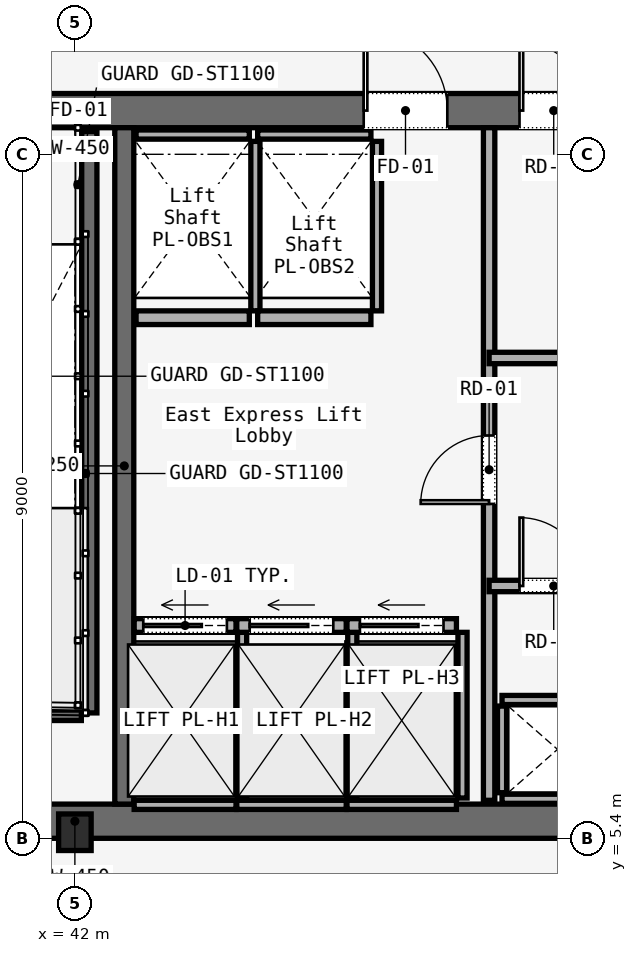
"""IFC4 building model, lengths in metres.
Left out: names, types, materials, properties, quantities, classifications, styles, units other than length and angle.
Written with IfcOpenShell. Run it as: python <this file> out.ifc"""

import sys

from ifc_helpers import new_model, si_unit, direction, frame, frame_2d, origin, origin_2d, place, context, subcontext, project, spatial, rectangle, i_section, extrude, element, fill, save


model = new_model("IFC4")
c1 = context("Model", 3, precision=1e-05, world=origin(), true_north=direction((0.0, 1.0)))
c2 = subcontext(c1, "Body", "Model", "MODEL_VIEW")
j1 = project(units=[si_unit("LENGTHUNIT", "METRE"), si_unit("PLANEANGLEUNIT", "RADIAN")], contexts=[c1])
p1 = place(None, origin())
s1 = spatial("IfcSite", under=j1, at=p1, CompositionType="ELEMENT")
p2 = place(p1, origin())
s2 = spatial("IfcBuilding", under=s1, at=p2, CompositionType="ELEMENT")
p3 = place(p2, frame((0.0, 0.0, 117.4)))
s3 = spatial("IfcBuildingStorey", under=s2, at=p3, CompositionType="ELEMENT", Elevation=117.4)
p4 = place(p3, frame((26.45, 14.975, 0.0), z_axis=(0.0, 0.0, 1.0), x_axis=(1.0, 0.0, 0.0)))
e1 = element("IfcWall", 1, at=p4, inside=s3, PredefinedType="SOLIDWALL", context=c2, shape_type="SweptSolid", body=[
    extrude(rectangle(XDim=31.1, YDim=0.45, at=frame_2d((15.55, 0.0))), origin(), (0.0, 0.0, 1.0), 4.52),
])
p5 = place(p4, frame((1.65, 0.0, 0.0)))
e2 = element("IfcOpeningElement", 2, at=p5, cuts=e1, PredefinedType="OPENING", context=c2, shape_type="SweptSolid", body=[
    extrude(rectangle(XDim=1.1, YDim=2.2, at=frame_2d((0.55, 1.1))), frame((0.0, 0.225, 0.0), z_axis=(0.0, -1.0, 0.0), x_axis=(1.0, 0.0, 0.0)), (0.0, 0.0, 1.0), 0.45),
])
p6 = place(p4, frame((13.65, 0.0, 0.0)))
e3 = element("IfcOpeningElement", 3, at=p6, cuts=e1, PredefinedType="OPENING", context=c2, shape_type="SweptSolid", body=[
    extrude(rectangle(XDim=1.1, YDim=2.2, at=frame_2d((0.55, 1.1))), frame((0.0, 0.225, 0.0), z_axis=(0.0, -1.0, 0.0), x_axis=(1.0, 0.0, 0.0)), (0.0, 0.0, 1.0), 0.45),
])
p7 = place(p4, frame((25.55, 0.0, 0.0)))
e4 = element("IfcOpeningElement", 4, at=p7, cuts=e1, PredefinedType="OPENING", context=c2, shape_type="SweptSolid", body=[
    extrude(rectangle(XDim=1.1, YDim=2.2, at=frame_2d((0.55, 1.1))), frame((0.0, 0.225, 0.0), z_axis=(0.0, -1.0, 0.0), x_axis=(1.0, 0.0, 0.0)), (0.0, 0.0, 1.0), 0.45),
])
p8 = place(p4, frame((10.7, 0.0, 0.0)))
e5 = element("IfcOpeningElement", 5, at=p8, cuts=e1, PredefinedType="OPENING", context=c2, shape_type="SweptSolid", body=[
    extrude(rectangle(XDim=1.4, YDim=2.2, at=frame_2d((0.7, 1.1))), frame((0.0, 0.225, 0.0), z_axis=(0.0, -1.0, 0.0), x_axis=(1.0, 0.0, 0.0)), (0.0, 0.0, 1.0), 0.45),
])
p9 = place(p4, frame((19.35, 0.0, 0.0)))
e6 = element("IfcOpeningElement", 6, at=p9, cuts=e1, PredefinedType="OPENING", context=c2, shape_type="SweptSolid", body=[
    extrude(rectangle(XDim=1.1, YDim=2.2, at=frame_2d((0.55, 1.1))), frame((0.0, 0.225, 0.0), z_axis=(0.0, -1.0, 0.0), x_axis=(1.0, 0.0, 0.0)), (0.0, 0.0, 1.0), 0.45),
])
p10 = place(p4, frame((21.4, 0.0, 0.0)))
e7 = element("IfcOpeningElement", 7, at=p10, cuts=e1, PredefinedType="OPENING", context=c2, shape_type="SweptSolid", body=[
    extrude(rectangle(XDim=0.9, YDim=2.1, at=frame_2d((0.45, 1.05))), frame((0.0, 0.225, 0.0), z_axis=(0.0, -1.0, 0.0), x_axis=(1.0, 0.0, 0.0)), (0.0, 0.0, 1.0), 0.45),
])
p11 = place(p4, frame((23.35, 0.0, 0.0)))
e8 = element("IfcOpeningElement", 8, at=p11, cuts=e1, PredefinedType="OPENING", context=c2, shape_type="SweptSolid", body=[
    extrude(rectangle(XDim=1.3, YDim=2.3, at=frame_2d((0.65, 1.15))), frame((0.0, 0.225, 0.0), z_axis=(0.0, -1.0, 0.0), x_axis=(1.0, 0.0, 0.0)), (0.0, 0.0, 1.0), 0.45),
])
p12 = place(p3, frame((26.45, 5.625, 0.0), z_axis=(0.0, 0.0, 1.0), x_axis=(1.0, 0.0, 0.0)))
e9 = element("IfcWall", 9, at=p12, inside=s3, PredefinedType="SOLIDWALL", context=c2, shape_type="SweptSolid", body=[
    extrude(rectangle(XDim=31.1, YDim=0.45, at=frame_2d((15.55, 0.0))), origin(), (0.0, 0.0, 1.0), 4.52),
])
p13 = place(p3, frame((42.65, 5.85, 0.0), z_axis=(0.0, 0.0, 1.0), x_axis=(0.0, 1.0, 0.0)))
e10 = element("IfcWall", 10, at=p13, inside=s3, PredefinedType="SOLIDWALL", context=c2, shape_type="SweptSolid", body=[
    extrude(rectangle(XDim=8.9, YDim=0.25, at=frame_2d((4.45, 0.0))), origin(), (0.0, 0.0, 1.0), 4.52),
])
p14 = place(p3, frame((42.0, 5.48, 0.0), z_axis=(0.0, 0.0, 1.0), x_axis=(1.0, 0.0, 0.0)))
e11 = element("IfcColumn", 11, at=p14, inside=s3, PredefinedType="COLUMN", context=c2, shape_type="SweptSolid", body=[
    extrude(i_section(OverallWidth=0.428, OverallDepth=0.481, WebThickness=0.051, FlangeThickness=0.065, FilletRadius=0.015, at=origin_2d()), origin(), (0.0, 0.0, 1.0), 4.52),
])
p15 = place(p3, frame((42.19, 14.7, 0.0), z_axis=(0.0, 0.0, 1.0), x_axis=(0.0, -1.0, 0.0)))
e12 = element("IfcWall", 12, at=p15, inside=s3, PredefinedType="SOLIDWALL", context=c2, shape_type="SweptSolid", body=[
    extrude(rectangle(XDim=7.65, YDim=0.2, at=frame_2d((3.825, 0.0))), origin(), (0.0, 0.0, 1.0), 4.8),
])
p16 = place(p3, frame((38.97, 7.05, 0.0), z_axis=(0.0, 0.0, 1.0), x_axis=(1.0, 0.0, 0.0)))
e13 = element("IfcWall", 13, at=p16, inside=s3, PredefinedType="SOLIDWALL", context=c2, shape_type="SweptSolid", body=[
    extrude(rectangle(XDim=3.115, YDim=0.2, at=frame_2d((1.558, 0.0))), origin(), (0.0, 0.0, 1.0), 4.8),
])
for number, where, z_axis, x_axis in (
    (14, (47.62, 5.92, 0.0), (0.0, 0.0, 1.0), (1.0, 0.0, 0.0)),
    (15, (47.62, 7.22, 0.0), (0.0, 0.0, 1.0), (1.0, 0.0, 0.0)),
):
    element("IfcWall", number, at=place(p3, frame(where, z_axis=z_axis, x_axis=x_axis)), inside=s3, PredefinedType="SOLIDWALL", context=c2, shape_type="SweptSolid", body=[
        extrude(rectangle(XDim=1.46, YDim=0.12, at=frame_2d((0.73, 0.0))), origin(), (0.0, 0.0, 1.0), 3.39),
    ])
p17 = place(p3, frame((47.62, 6.0, 0.0), z_axis=(0.0, 0.0, 1.0), x_axis=(0.0, 1.0, 0.0)))
e16 = element("IfcWall", 16, at=p17, inside=s3, PredefinedType="SOLIDWALL", context=c2, shape_type="SweptSolid", body=[
    extrude(rectangle(XDim=1.14, YDim=0.12, at=frame_2d((0.57, 0.0))), origin(), (0.0, 0.0, 1.0), 3.39),
])
p18 = place(p3, frame((47.45, 5.9, 0.0), z_axis=(0.0, 0.0, 1.0), x_axis=(0.0, 1.0, 0.0)))
e17 = element("IfcWall", 17, at=p18, inside=s3, PredefinedType="PARTITIONING", context=c2, shape_type="SweptSolid", body=[
    extrude(rectangle(XDim=8.85, YDim=0.15, at=frame_2d((4.425, 0.0))), origin(), (0.0, 0.0, 1.0), 3.39),
])
p19 = place(p18, frame((3.9, 0.0, 0.0)))
e18 = element("IfcOpeningElement", 18, at=p19, cuts=e17, PredefinedType="OPENING", context=c2, shape_type="SweptSolid", body=[
    extrude(rectangle(XDim=0.9, YDim=2.1, at=frame_2d((0.45, 1.05))), frame((0.0, 0.075, 0.0), z_axis=(0.0, -1.0, 0.0), x_axis=(1.0, 0.0, 0.0)), (0.0, 0.0, 1.0), 0.15),
])
p20 = place(p3, frame((47.45, 8.72, 0.0), z_axis=(0.0, 0.0, 1.0), x_axis=(1.0, 0.0, 0.0)))
e19 = element("IfcWall", 19, at=p20, inside=s3, PredefinedType="PARTITIONING", context=c2, shape_type="SweptSolid", body=[
    extrude(rectangle(XDim=1.73, YDim=0.15, at=frame_2d((0.865, 0.0))), origin(), (0.0, 0.0, 1.0), 3.39),
])
p21 = place(p20, frame((0.4, 0.0, 0.0)))
e20 = element("IfcOpeningElement", 20, at=p21, cuts=e19, PredefinedType="OPENING", context=c2, shape_type="SweptSolid", body=[
    extrude(rectangle(XDim=0.9, YDim=2.1, at=frame_2d((0.45, 1.05))), frame((0.0, 0.075, 0.0), z_axis=(0.0, -1.0, 0.0), x_axis=(1.0, 0.0, 0.0)), (0.0, 0.0, 1.0), 0.15),
])
p22 = place(p3, frame((47.45, 11.72, 0.0), z_axis=(0.0, 0.0, 1.0), x_axis=(1.0, 0.0, 0.0)))
e21 = element("IfcWall", 21, at=p22, inside=s3, PredefinedType="PARTITIONING", context=c2, shape_type="SweptSolid", body=[
    extrude(rectangle(XDim=1.73, YDim=0.15, at=frame_2d((0.865, 0.0))), origin(), (0.0, 0.0, 1.0), 3.39),
])
p23 = place(p3, frame((42.78, 8.2, 0.0), z_axis=(0.0, 0.0, 1.0), x_axis=(1.0, 0.0, 0.0)))
e22 = element("IfcWall", 22, at=p23, inside=s3, PredefinedType="SOLIDWALL", context=c2, shape_type="SweptSolid", body=[
    extrude(rectangle(XDim=1.34, YDim=0.18, at=frame_2d((0.67, 0.0))), origin(), (0.0, 0.0, 1.0), 3.39),
])
p24 = place(p23, frame((0.12, 0.0, 0.0)))
e23 = element("IfcOpeningElement", 23, at=p24, cuts=e22, PredefinedType="OPENING", context=c2, shape_type="SweptSolid", body=[
    extrude(rectangle(XDim=1.1, YDim=2.2, at=frame_2d((0.55, 1.1))), frame((0.0, 0.09, 0.0), z_axis=(0.0, -1.0, 0.0), x_axis=(1.0, 0.0, 0.0)), (0.0, 0.0, 1.0), 0.18),
])
p25 = place(p3, frame((42.78, 5.84, 0.0), z_axis=(0.0, 0.0, 1.0), x_axis=(1.0, 0.0, 0.0)))
e24 = element("IfcWall", 24, at=p25, inside=s3, PredefinedType="SOLIDWALL", context=c2, shape_type="SweptSolid", body=[
    extrude(rectangle(XDim=1.34, YDim=0.12, at=frame_2d((0.67, 0.0))), origin(), (0.0, 0.0, 1.0), 3.39),
])
p26 = place(p3, frame((44.2, 5.93, 0.0), z_axis=(0.0, 0.0, 1.0), x_axis=(0.0, 1.0, 0.0)))
e25 = element("IfcWall", 25, at=p26, inside=s3, PredefinedType="SOLIDWALL", context=c2, shape_type="SweptSolid", body=[
    extrude(rectangle(XDim=2.18, YDim=0.12, at=frame_2d((1.09, 0.0))), origin(), (0.0, 0.0, 1.0), 3.39),
])
p27 = place(p3, frame((44.13, 8.2, 0.0), z_axis=(0.0, 0.0, 1.0), x_axis=(1.0, 0.0, 0.0)))
e26 = element("IfcWall", 26, at=p27, inside=s3, PredefinedType="SOLIDWALL", context=c2, shape_type="SweptSolid", body=[
    extrude(rectangle(XDim=1.44, YDim=0.18, at=frame_2d((0.72, 0.0))), origin(), (0.0, 0.0, 1.0), 3.39),
])
p28 = place(p27, frame((0.17, 0.0, 0.0)))
e27 = element("IfcOpeningElement", 27, at=p28, cuts=e26, PredefinedType="OPENING", context=c2, shape_type="SweptSolid", body=[
    extrude(rectangle(XDim=1.1, YDim=2.2, at=frame_2d((0.55, 1.1))), frame((0.0, 0.09, 0.0), z_axis=(0.0, -1.0, 0.0), x_axis=(1.0, 0.0, 0.0)), (0.0, 0.0, 1.0), 0.18),
])
p29 = place(p3, frame((44.13, 5.84, 0.0), z_axis=(0.0, 0.0, 1.0), x_axis=(1.0, 0.0, 0.0)))
e28 = element("IfcWall", 28, at=p29, inside=s3, PredefinedType="SOLIDWALL", context=c2, shape_type="SweptSolid", body=[
    extrude(rectangle(XDim=1.44, YDim=0.12, at=frame_2d((0.72, 0.0))), origin(), (0.0, 0.0, 1.0), 3.39),
])
p30 = place(p3, frame((45.65, 5.93, 0.0), z_axis=(0.0, 0.0, 1.0), x_axis=(0.0, 1.0, 0.0)))
e29 = element("IfcWall", 29, at=p30, inside=s3, PredefinedType="SOLIDWALL", context=c2, shape_type="SweptSolid", body=[
    extrude(rectangle(XDim=2.18, YDim=0.12, at=frame_2d((1.09, 0.0))), origin(), (0.0, 0.0, 1.0), 3.39),
])
p31 = place(p3, frame((45.58, 8.2, 0.0), z_axis=(0.0, 0.0, 1.0), x_axis=(1.0, 0.0, 0.0)))
e30 = element("IfcWall", 30, at=p31, inside=s3, PredefinedType="SOLIDWALL", context=c2, shape_type="SweptSolid", body=[
    extrude(rectangle(XDim=1.44, YDim=0.18, at=frame_2d((0.72, 0.0))), origin(), (0.0, 0.0, 1.0), 3.39),
])
p32 = place(p31, frame((0.17, 0.0, 0.0)))
e31 = element("IfcOpeningElement", 31, at=p32, cuts=e30, PredefinedType="OPENING", context=c2, shape_type="SweptSolid", body=[
    extrude(rectangle(XDim=1.1, YDim=2.2, at=frame_2d((0.55, 1.1))), frame((0.0, 0.09, 0.0), z_axis=(0.0, -1.0, 0.0), x_axis=(1.0, 0.0, 0.0)), (0.0, 0.0, 1.0), 0.18),
])
p33 = place(p3, frame((45.58, 5.84, 0.0), z_axis=(0.0, 0.0, 1.0), x_axis=(1.0, 0.0, 0.0)))
e32 = element("IfcWall", 32, at=p33, inside=s3, PredefinedType="SOLIDWALL", context=c2, shape_type="SweptSolid", body=[
    extrude(rectangle(XDim=1.44, YDim=0.12, at=frame_2d((0.72, 0.0))), origin(), (0.0, 0.0, 1.0), 3.39),
])
p34 = place(p3, frame((47.1, 5.93, 0.0), z_axis=(0.0, 0.0, 1.0), x_axis=(0.0, 1.0, 0.0)))
e33 = element("IfcWall", 33, at=p34, inside=s3, PredefinedType="SOLIDWALL", context=c2, shape_type="SweptSolid", body=[
    extrude(rectangle(XDim=2.18, YDim=0.12, at=frame_2d((1.09, 0.0))), origin(), (0.0, 0.0, 1.0), 3.39),
])
p35 = place(p3, frame((42.805, 12.25, 0.0), z_axis=(0.0, 0.0, 1.0), x_axis=(1.0, 0.0, 0.0)))
e34 = element("IfcWall", 34, at=p35, inside=s3, PredefinedType="SOLIDWALL", context=c2, shape_type="SweptSolid", body=[
    extrude(rectangle(XDim=1.49, YDim=0.18, at=frame_2d((0.745, 0.0))), origin(), (0.0, 0.0, 1.0), 3.39),
])
p36 = place(p3, frame((42.805, 14.66, 0.0), z_axis=(0.0, 0.0, 1.0), x_axis=(1.0, 0.0, 0.0)))
e35 = element("IfcWall", 35, at=p36, inside=s3, PredefinedType="SOLIDWALL", context=c2, shape_type="SweptSolid", body=[
    extrude(rectangle(XDim=1.49, YDim=0.12, at=frame_2d((0.745, 0.0))), origin(), (0.0, 0.0, 1.0), 3.39),
])
p37 = place(p3, frame((44.375, 12.34, 0.0), z_axis=(0.0, 0.0, 1.0), x_axis=(0.0, 1.0, 0.0)))
e36 = element("IfcWall", 36, at=p37, inside=s3, PredefinedType="SOLIDWALL", context=c2, shape_type="SweptSolid", body=[
    extrude(rectangle(XDim=2.23, YDim=0.12, at=frame_2d((1.115, 0.0))), origin(), (0.0, 0.0, 1.0), 3.39),
])
p38 = place(p3, frame((44.405, 12.25, 0.0), z_axis=(0.0, 0.0, 1.0), x_axis=(1.0, 0.0, 0.0)))
e37 = element("IfcWall", 37, at=p38, inside=s3, PredefinedType="SOLIDWALL", context=c2, shape_type="SweptSolid", body=[
    extrude(rectangle(XDim=1.49, YDim=0.18, at=frame_2d((0.745, 0.0))), origin(), (0.0, 0.0, 1.0), 3.39),
])
p39 = place(p3, frame((44.405, 14.66, 0.0), z_axis=(0.0, 0.0, 1.0), x_axis=(1.0, 0.0, 0.0)))
e38 = element("IfcWall", 38, at=p39, inside=s3, PredefinedType="SOLIDWALL", context=c2, shape_type="SweptSolid", body=[
    extrude(rectangle(XDim=1.49, YDim=0.12, at=frame_2d((0.745, 0.0))), origin(), (0.0, 0.0, 1.0), 3.39),
])
p40 = place(p3, frame((45.975, 12.34, 0.0), z_axis=(0.0, 0.0, 1.0), x_axis=(0.0, 1.0, 0.0)))
e39 = element("IfcWall", 39, at=p40, inside=s3, PredefinedType="SOLIDWALL", context=c2, shape_type="SweptSolid", body=[
    extrude(rectangle(XDim=2.23, YDim=0.12, at=frame_2d((1.115, 0.0))), origin(), (0.0, 0.0, 1.0), 3.39),
])
p41 = place(p9, origin())
e40 = element("IfcDoor", 40, at=p41, inside=s3, OperationType="SINGLE_SWING_LEFT", PredefinedType="DOOR", context=c2, shape_type="SweptSolid", body=[
    extrude(rectangle(XDim=1.1, YDim=2.2, at=frame_2d((0.55, 1.1))), frame((0.0, 0.025, 0.0), z_axis=(0.0, -1.0, 0.0), x_axis=(1.0, 0.0, 0.0)), (0.0, 0.0, 1.0), 0.05),
])
fill(e6, e40)
p42 = place(p10, origin())
e41 = element("IfcDoor", 41, at=p42, inside=s3, OperationType="SINGLE_SWING_LEFT", PredefinedType="DOOR", context=c2, shape_type="SweptSolid", body=[
    extrude(rectangle(XDim=0.9, YDim=2.1, at=frame_2d((0.45, 1.05))), frame((0.0, 0.025, 0.0), z_axis=(0.0, -1.0, 0.0), x_axis=(1.0, 0.0, 0.0)), (0.0, 0.0, 1.0), 0.05),
])
fill(e7, e41)
p43 = place(p19, origin())
e42 = element("IfcDoor", 42, at=p43, inside=s3, OperationType="SINGLE_SWING_LEFT", PredefinedType="DOOR", context=c2, shape_type="SweptSolid", body=[
    extrude(rectangle(XDim=0.9, YDim=2.1, at=frame_2d((0.45, 1.05))), frame((0.0, 0.025, 0.0), z_axis=(0.0, -1.0, 0.0), x_axis=(1.0, 0.0, 0.0)), (0.0, 0.0, 1.0), 0.05),
])
fill(e18, e42)
p44 = place(p21, origin())
e43 = element("IfcDoor", 43, at=p44, inside=s3, OperationType="SINGLE_SWING_RIGHT", PredefinedType="DOOR", context=c2, shape_type="SweptSolid", body=[
    extrude(rectangle(XDim=0.9, YDim=2.1, at=frame_2d((0.45, 1.05))), frame((0.0, 0.025, 0.0), z_axis=(0.0, -1.0, 0.0), x_axis=(1.0, 0.0, 0.0)), (0.0, 0.0, 1.0), 0.05),
])
fill(e20, e43)
p45 = place(p24, origin())
e44 = element("IfcDoor", 44, at=p45, inside=s3, OperationType="SLIDING_TO_LEFT", PredefinedType="DOOR", context=c2, shape_type="SweptSolid", body=[
    extrude(rectangle(XDim=1.1, YDim=2.2, at=frame_2d((0.55, 1.1))), frame((0.0, 0.025, 0.0), z_axis=(0.0, -1.0, 0.0), x_axis=(1.0, 0.0, 0.0)), (0.0, 0.0, 1.0), 0.05),
])
fill(e23, e44)
p46 = place(p28, origin())
e45 = element("IfcDoor", 45, at=p46, inside=s3, OperationType="SLIDING_TO_LEFT", PredefinedType="DOOR", context=c2, shape_type="SweptSolid", body=[
    extrude(rectangle(XDim=1.1, YDim=2.2, at=frame_2d((0.55, 1.1))), frame((0.0, 0.025, 0.0), z_axis=(0.0, -1.0, 0.0), x_axis=(1.0, 0.0, 0.0)), (0.0, 0.0, 1.0), 0.05),
])
fill(e27, e45)
p47 = place(p32, origin())
e46 = element("IfcDoor", 46, at=p47, inside=s3, OperationType="SLIDING_TO_LEFT", PredefinedType="DOOR", context=c2, shape_type="SweptSolid", body=[
    extrude(rectangle(XDim=1.1, YDim=2.2, at=frame_2d((0.55, 1.1))), frame((0.0, 0.025, 0.0), z_axis=(0.0, -1.0, 0.0), x_axis=(1.0, 0.0, 0.0)), (0.0, 0.0, 1.0), 0.05),
])
fill(e31, e46)
save(model, sys.argv[1])
